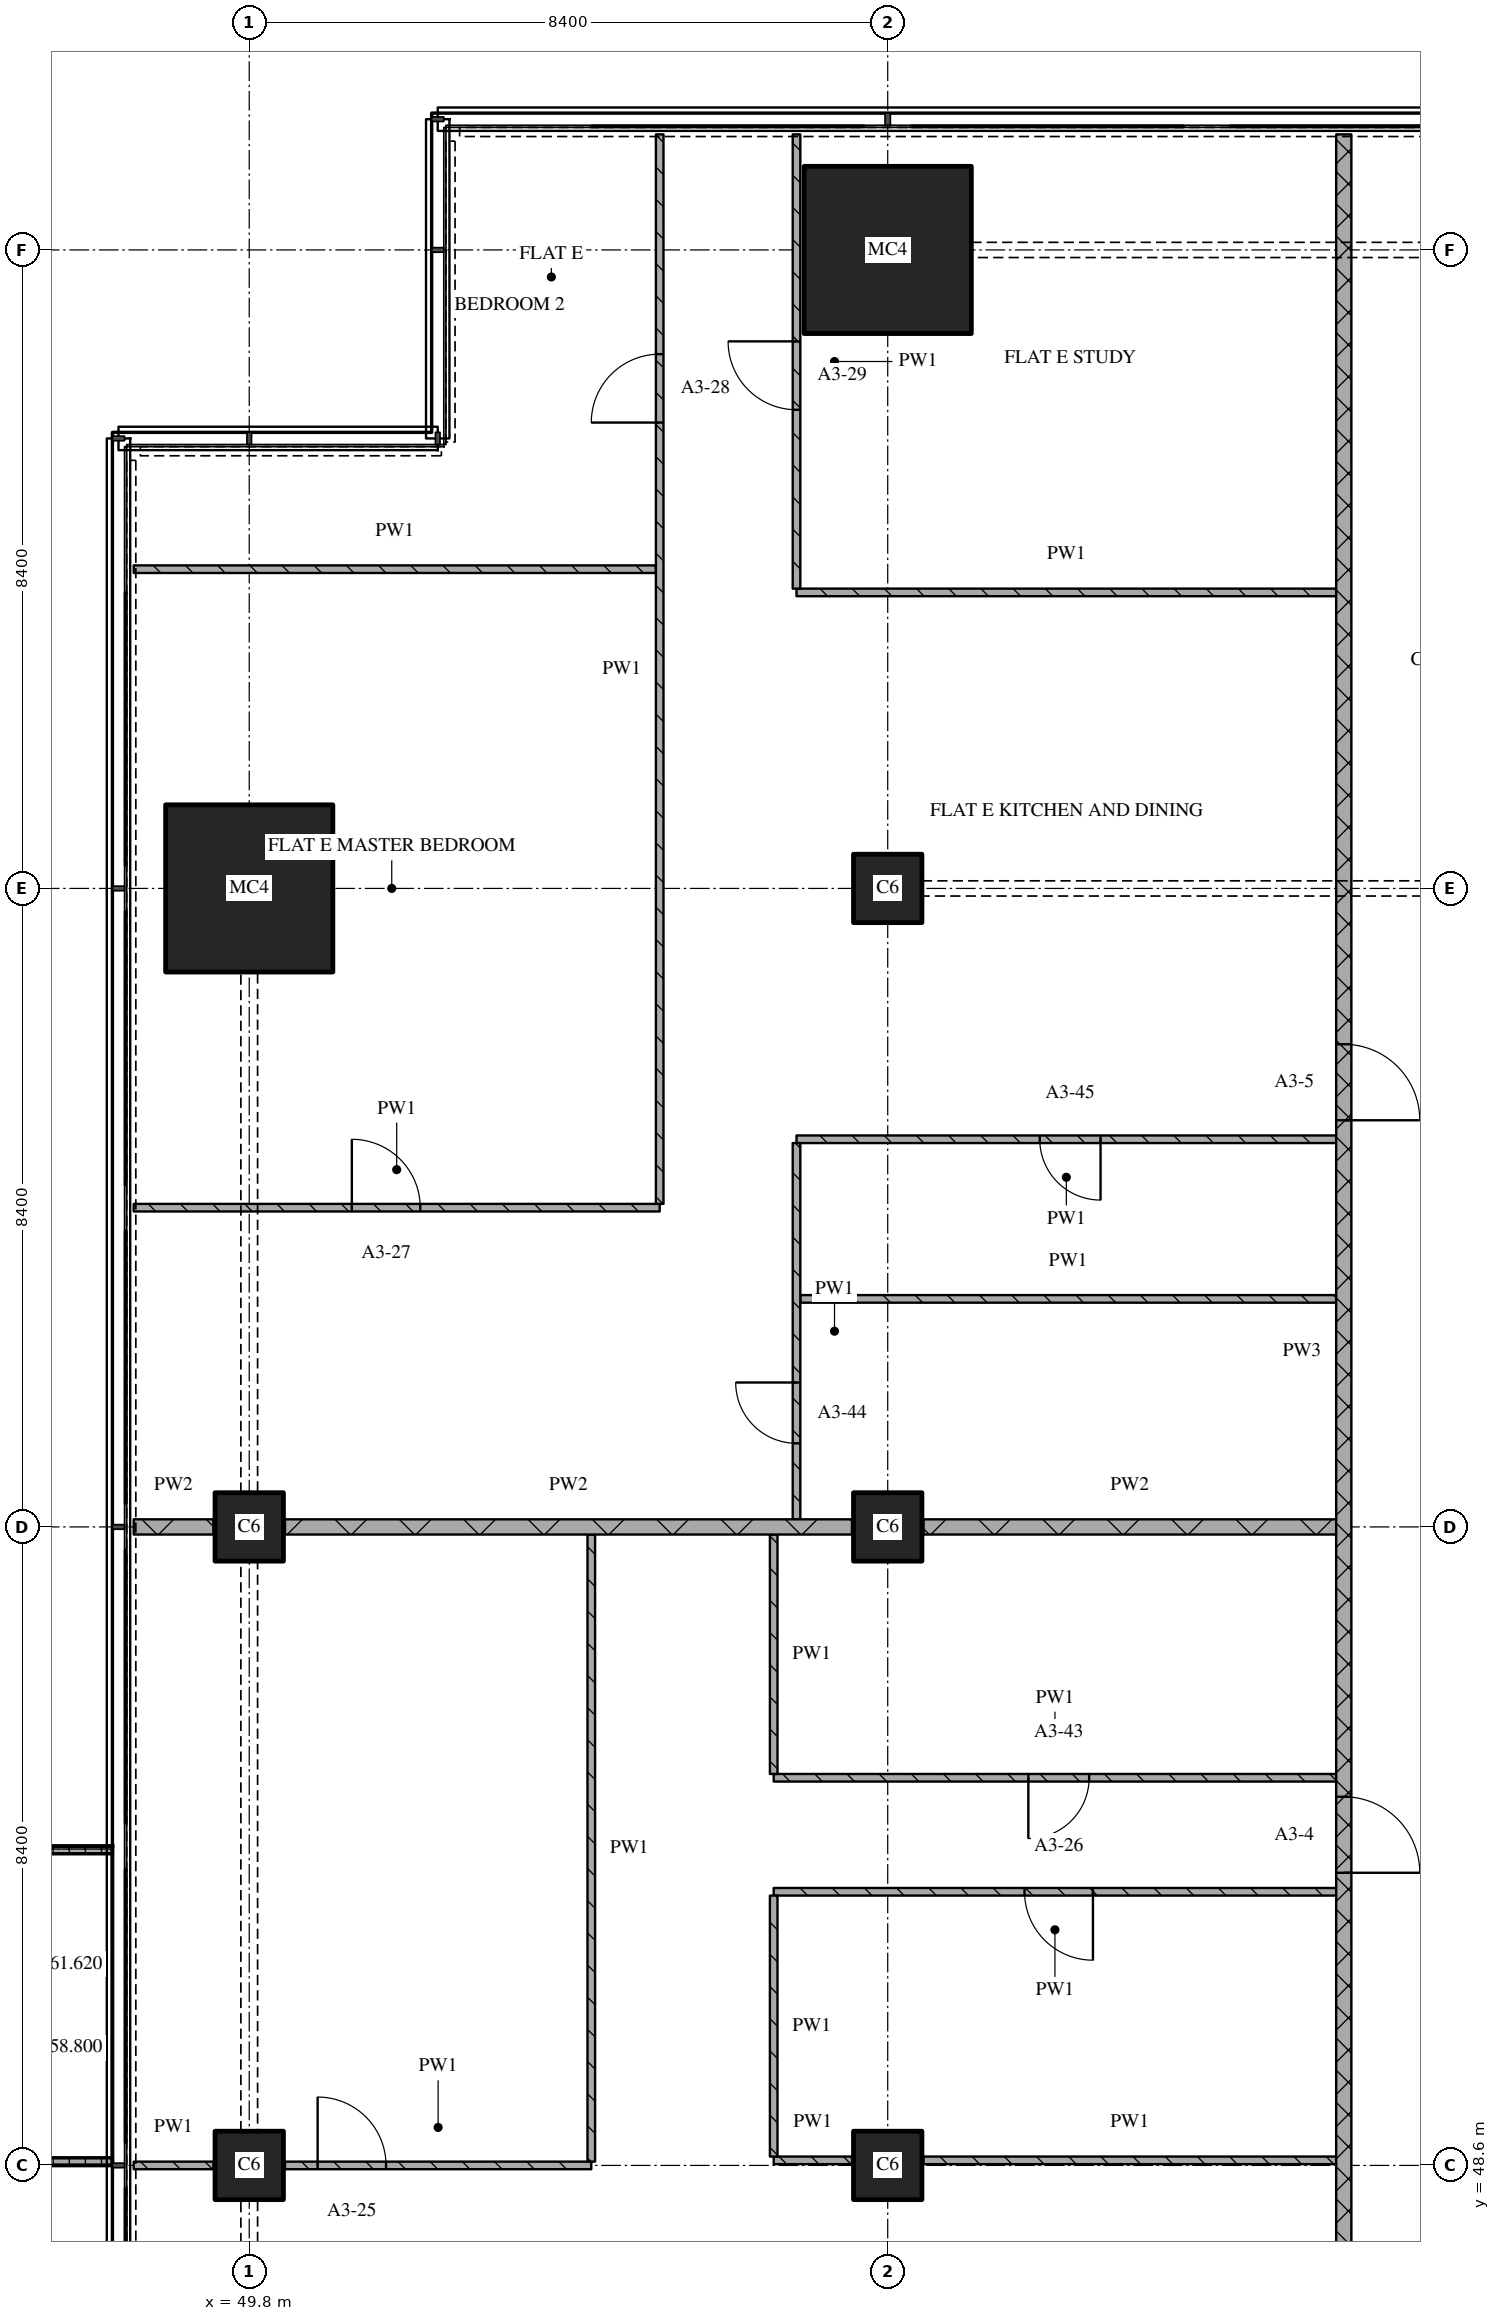
"""IFC4 building model, lengths in metres.
Left out: names, types, materials, properties, quantities, classifications, styles, units other than length and angle.
Written with IfcOpenShell. Run it as: python <this file> out.ifc"""

import sys

from ifc_helpers import new_model, si_unit, direction, frame, frame_2d, origin, origin_2d, place, context, subcontext, project, spatial, polyline, rectangle, outline, extrude, element, fill, save


model = new_model("IFC4")
c1 = context("Model", 3, precision=1e-05, world=origin(), true_north=direction((0.0, 1.0)))
c2 = subcontext(c1, "Body", "Model", "MODEL_VIEW")
j1 = project(units=[si_unit("LENGTHUNIT", "METRE"), si_unit("PLANEANGLEUNIT", "RADIAN")], contexts=[c1])
p1 = place(None, origin())
s1 = spatial("IfcSite", under=j1, at=p1, CompositionType="ELEMENT")
p2 = place(p1, origin())
s2 = spatial("IfcBuilding", under=s1, at=p2, CompositionType="ELEMENT")
p3 = place(p2, frame((0.0, 0.0, 58.8)))
s3 = spatial("IfcBuildingStorey", under=s2, at=p3, CompositionType="ELEMENT", Elevation=58.8)
for number, where, z_axis, x_axis in (
    (1, (49.8, 48.6, 0.0), (0.0, 0.0, 1.0), (1.0, 0.0, 0.0)),
    (2, (49.8, 57.0, 0.0), (0.0, 0.0, 1.0), (1.0, 0.0, 0.0)),
):
    element("IfcColumn", number, at=place(p3, frame(where, z_axis=z_axis, x_axis=x_axis)), inside=s3, PredefinedType="COLUMN", context=c2, shape_type="SweptSolid", body=[
        extrude(rectangle(XDim=0.9, YDim=0.9, at=origin_2d()), origin(), (0.0, 0.0, 1.0), 3.6),
    ])
p4 = place(p3, frame((49.8, 65.4, 0.0), z_axis=(0.0, 0.0, 1.0), x_axis=(1.0, 0.0, 0.0)))
e3 = element("IfcColumn", 3, at=p4, inside=s3, PredefinedType="COLUMN", context=c2, shape_type="SweptSolid", body=[
    extrude(rectangle(XDim=2.2, YDim=2.2, at=origin_2d()), origin(), (0.0, 0.0, 1.0), 3.6),
])
for number, where, z_axis, x_axis in (
    (4, (58.2, 48.6, 0.0), (0.0, 0.0, 1.0), (1.0, 0.0, 0.0)),
    (5, (58.2, 57.0, 0.0), (0.0, 0.0, 1.0), (1.0, 0.0, 0.0)),
    (6, (58.2, 65.4, 0.0), (0.0, 0.0, 1.0), (1.0, 0.0, 0.0)),
):
    element("IfcColumn", number, at=place(p3, frame(where, z_axis=z_axis, x_axis=x_axis)), inside=s3, PredefinedType="COLUMN", context=c2, shape_type="SweptSolid", body=[
        extrude(rectangle(XDim=0.9, YDim=0.9, at=origin_2d()), origin(), (0.0, 0.0, 1.0), 3.6),
    ])
p5 = place(p3, frame((58.2, 73.8, 0.0), z_axis=(0.0, 0.0, 1.0), x_axis=(1.0, 0.0, 0.0)))
e7 = element("IfcColumn", 7, at=p5, inside=s3, PredefinedType="COLUMN", context=c2, shape_type="SweptSolid", body=[
    extrude(rectangle(XDim=2.2, YDim=2.2, at=origin_2d()), origin(), (0.0, 0.0, 1.0), 3.6),
])
p6 = place(p3, origin())
e8 = element("IfcWall", 8, at=p6, inside=s3, PredefinedType="SOLIDWALL", context=c2, shape_type="SweptSolid", body=[
    extrude(outline(polyline([(48.0, 52.8), (48.0, 52.7), (46.367, 52.7), (46.367, 48.7), (48.0, 48.7), (48.0, 48.6), (46.267, 48.6), (46.267, 52.8), (48.0, 52.8)])), origin(), (0.0, 0.0, 1.0), 1.0),
])
p7 = place(p3, frame((48.28, 48.6, 0.0), z_axis=(0.0, 0.0, 1.0), x_axis=(1.0, 0.0, 0.0)))
e9 = element("IfcWall", 9, at=p7, inside=s3, PredefinedType="PARTITIONING", context=c2, shape_type="SweptSolid", body=[
    extrude(rectangle(XDim=1.05, YDim=0.1, at=frame_2d((0.525, 0.0))), origin(), (0.0, 0.0, 1.0), 3.32),
])
p8 = place(p3, frame((50.27, 48.6, 0.0), z_axis=(0.0, 0.0, 1.0), x_axis=(1.0, 0.0, 0.0)))
e10 = element("IfcWall", 10, at=p8, inside=s3, PredefinedType="PARTITIONING", context=c2, shape_type="SweptSolid", body=[
    extrude(rectangle(XDim=4.03, YDim=0.1, at=frame_2d((2.015, 0.0))), origin(), (0.0, 0.0, 1.0), 3.32),
])
p9 = place(p8, frame((0.43, 0.0, 0.0)))
e11 = element("IfcOpeningElement", 11, at=p9, cuts=e10, PredefinedType="OPENING", context=c2, shape_type="SweptSolid", body=[
    extrude(rectangle(XDim=0.9, YDim=2.1, at=frame_2d((0.45, 1.05))), frame((0.0, 0.06, 0.0), z_axis=(0.0, -1.0, 0.0), x_axis=(1.0, 0.0, 0.0)), (0.0, 0.0, 1.0), 0.12),
])
p10 = place(p3, frame((56.7, 48.667, 0.0), z_axis=(0.0, 0.0, 1.0), x_axis=(1.0, 0.0, 0.0)))
e12 = element("IfcWall", 12, at=p10, inside=s3, PredefinedType="PARTITIONING", context=c2, shape_type="SweptSolid", body=[
    extrude(rectangle(XDim=1.03, YDim=0.1, at=frame_2d((0.515, 0.0))), origin(), (0.0, 0.0, 1.0), 3.32),
])
p11 = place(p3, frame((58.67, 48.667, 0.0), z_axis=(0.0, 0.0, 1.0), x_axis=(1.0, 0.0, 0.0)))
e13 = element("IfcWall", 13, at=p11, inside=s3, PredefinedType="PARTITIONING", context=c2, shape_type="SweptSolid", body=[
    extrude(rectangle(XDim=5.43, YDim=0.1, at=frame_2d((2.715, 0.0))), origin(), (0.0, 0.0, 1.0), 3.32),
])
p12 = place(p3, frame((64.1, 52.2, 0.0), z_axis=(0.0, 0.0, 1.0), x_axis=(-1.0, 0.0, 0.0)))
e14 = element("IfcWall", 14, at=p12, inside=s3, PredefinedType="PARTITIONING", context=c2, shape_type="SweptSolid", body=[
    extrude(rectangle(XDim=7.4, YDim=0.1, at=frame_2d((3.7, 0.0))), origin(), (0.0, 0.0, 1.0), 3.32),
])
p13 = place(p12, frame((3.2, 0.0, 0.0)))
e15 = element("IfcOpeningElement", 15, at=p13, cuts=e14, PredefinedType="OPENING", context=c2, shape_type="SweptSolid", body=[
    extrude(rectangle(XDim=0.9, YDim=2.1, at=frame_2d((0.45, 1.05))), frame((0.0, 0.06, 0.0), z_axis=(0.0, -1.0, 0.0), x_axis=(1.0, 0.0, 0.0)), (0.0, 0.0, 1.0), 0.12),
])
p14 = place(p3, frame((56.7, 53.7, 0.0), z_axis=(0.0, 0.0, 1.0), x_axis=(1.0, 0.0, 0.0)))
e16 = element("IfcWall", 16, at=p14, inside=s3, PredefinedType="PARTITIONING", context=c2, shape_type="SweptSolid", body=[
    extrude(rectangle(XDim=7.4, YDim=0.1, at=frame_2d((3.7, 0.0))), origin(), (0.0, 0.0, 1.0), 3.32),
])
p15 = place(p14, frame((3.35, 0.0, 0.0)))
e17 = element("IfcOpeningElement", 17, at=p15, cuts=e16, PredefinedType="OPENING", context=c2, shape_type="SweptSolid", body=[
    extrude(rectangle(XDim=0.8, YDim=2.1, at=frame_2d((0.4, 1.05))), frame((0.0, 0.06, 0.0), z_axis=(0.0, -1.0, 0.0), x_axis=(1.0, 0.0, 0.0)), (0.0, 0.0, 1.0), 0.12),
])
p16 = place(p3, frame((48.28, 57.0, 0.0), z_axis=(0.0, 0.0, 1.0), x_axis=(1.0, 0.0, 0.0)))
e18 = element("IfcWall", 18, at=p16, inside=s3, PredefinedType="PARTITIONING", context=c2, shape_type="SweptSolid", body=[
    extrude(rectangle(XDim=1.05, YDim=0.2, at=frame_2d((0.525, 0.0))), origin(), (0.0, 0.0, 1.0), 3.32),
])
p17 = place(p3, frame((50.27, 57.0, 0.0), z_axis=(0.0, 0.0, 1.0), x_axis=(1.0, 0.0, 0.0)))
e19 = element("IfcWall", 19, at=p17, inside=s3, PredefinedType="PARTITIONING", context=c2, shape_type="SweptSolid", body=[
    extrude(rectangle(XDim=7.46, YDim=0.2, at=frame_2d((3.73, 0.0))), origin(), (0.0, 0.0, 1.0), 3.32),
])
p18 = place(p3, frame((58.67, 57.0, 0.0), z_axis=(0.0, 0.0, 1.0), x_axis=(1.0, 0.0, 0.0)))
e20 = element("IfcWall", 20, at=p18, inside=s3, PredefinedType="PARTITIONING", context=c2, shape_type="SweptSolid", body=[
    extrude(rectangle(XDim=5.43, YDim=0.2, at=frame_2d((2.715, 0.0))), origin(), (0.0, 0.0, 1.0), 3.32),
])
p19 = place(p3, frame((57.05, 60.0, 0.0), z_axis=(0.0, 0.0, 1.0), x_axis=(1.0, 0.0, 0.0)))
e21 = element("IfcWall", 21, at=p19, inside=s3, PredefinedType="PARTITIONING", context=c2, shape_type="SweptSolid", body=[
    extrude(rectangle(XDim=7.05, YDim=0.1, at=frame_2d((3.525, 0.0))), origin(), (0.0, 0.0, 1.0), 3.32),
])
p20 = place(p3, frame((48.28, 61.2, 0.0), z_axis=(0.0, 0.0, 1.0), x_axis=(1.0, 0.0, 0.0)))
e22 = element("IfcWall", 22, at=p20, inside=s3, PredefinedType="PARTITIONING", context=c2, shape_type="SweptSolid", body=[
    extrude(rectangle(XDim=6.92, YDim=0.1, at=frame_2d((3.46, 0.0))), origin(), (0.0, 0.0, 1.0), 3.32),
])
p21 = place(p20, frame((2.87, 0.0, 0.0)))
e23 = element("IfcOpeningElement", 23, at=p21, cuts=e22, PredefinedType="OPENING", context=c2, shape_type="SweptSolid", body=[
    extrude(rectangle(XDim=0.9, YDim=2.1, at=frame_2d((0.45, 1.05))), frame((0.0, 0.06, 0.0), z_axis=(0.0, -1.0, 0.0), x_axis=(1.0, 0.0, 0.0)), (0.0, 0.0, 1.0), 0.12),
])
p22 = place(p3, frame((64.1, 62.1, 0.0), z_axis=(0.0, 0.0, 1.0), x_axis=(-1.0, 0.0, 0.0)))
e24 = element("IfcWall", 24, at=p22, inside=s3, PredefinedType="PARTITIONING", context=c2, shape_type="SweptSolid", body=[
    extrude(rectangle(XDim=7.1, YDim=0.1, at=frame_2d((3.55, 0.0))), origin(), (0.0, 0.0, 1.0), 3.32),
])
p23 = place(p22, frame((3.1, 0.0, 0.0)))
e25 = element("IfcOpeningElement", 25, at=p23, cuts=e24, PredefinedType="OPENING", context=c2, shape_type="SweptSolid", body=[
    extrude(rectangle(XDim=0.8, YDim=2.1, at=frame_2d((0.4, 1.05))), frame((0.0, 0.06, 0.0), z_axis=(0.0, -1.0, 0.0), x_axis=(1.0, 0.0, 0.0)), (0.0, 0.0, 1.0), 0.12),
])
p24 = place(p3, frame((57.0, 69.294, 0.0), z_axis=(0.0, 0.0, 1.0), x_axis=(1.0, 0.0, 0.0)))
e26 = element("IfcWall", 26, at=p24, inside=s3, PredefinedType="PARTITIONING", context=c2, shape_type="SweptSolid", body=[
    extrude(rectangle(XDim=7.1, YDim=0.1, at=frame_2d((3.55, 0.0))), origin(), (0.0, 0.0, 1.0), 3.32),
])
p25 = place(p3, frame((48.28, 69.6, 0.0), z_axis=(0.0, 0.0, 1.0), x_axis=(1.0, 0.0, 0.0)))
e27 = element("IfcWall", 27, at=p25, inside=s3, PredefinedType="PARTITIONING", context=c2, shape_type="SweptSolid", body=[
    extrude(rectangle(XDim=6.87, YDim=0.1, at=frame_2d((3.435, 0.0))), origin(), (0.0, 0.0, 1.0), 3.32),
])
p26 = place(p3, frame((54.3, 56.9, 0.0), z_axis=(0.0, 0.0, 1.0), x_axis=(0.0, -1.0, 0.0)))
e28 = element("IfcWall", 28, at=p26, inside=s3, PredefinedType="PARTITIONING", context=c2, shape_type="SweptSolid", body=[
    extrude(rectangle(XDim=8.25, YDim=0.1, at=frame_2d((4.125, 0.0))), origin(), (0.0, 0.0, 1.0), 3.32),
])
p27 = place(p3, frame((55.2, 61.25, 0.0), z_axis=(0.0, 0.0, 1.0), x_axis=(0.0, 1.0, 0.0)))
e29 = element("IfcWall", 29, at=p27, inside=s3, PredefinedType="PARTITIONING", context=c2, shape_type="SweptSolid", body=[
    extrude(rectangle(XDim=14.07, YDim=0.1, at=frame_2d((7.035, 0.0))), origin(), (0.0, 0.0, 1.0), 3.32),
])
p28 = place(p27, frame((10.279, 0.0, 0.0)))
e30 = element("IfcOpeningElement", 30, at=p28, cuts=e29, PredefinedType="OPENING", context=c2, shape_type="SweptSolid", body=[
    extrude(rectangle(XDim=0.9, YDim=2.1, at=frame_2d((0.45, 1.05))), frame((0.0, 0.06, 0.0), z_axis=(0.0, -1.0, 0.0), x_axis=(1.0, 0.0, 0.0)), (0.0, 0.0, 1.0), 0.12),
])
p29 = place(p3, frame((56.7, 52.15, 0.0), z_axis=(0.0, 0.0, 1.0), x_axis=(0.0, -1.0, 0.0)))
e31 = element("IfcWall", 31, at=p29, inside=s3, PredefinedType="PARTITIONING", context=c2, shape_type="SweptSolid", body=[
    extrude(rectangle(XDim=3.433, YDim=0.1, at=frame_2d((1.717, 0.0))), origin(), (0.0, 0.0, 1.0), 3.32),
])
p30 = place(p3, frame((56.7, 56.9, 0.0), z_axis=(0.0, 0.0, 1.0), x_axis=(0.0, -1.0, 0.0)))
e32 = element("IfcWall", 32, at=p30, inside=s3, PredefinedType="PARTITIONING", context=c2, shape_type="SweptSolid", body=[
    extrude(rectangle(XDim=3.15, YDim=0.1, at=frame_2d((1.575, 0.0))), origin(), (0.0, 0.0, 1.0), 3.32),
])
p31 = place(p3, frame((57.0, 62.05, 0.0), z_axis=(0.0, 0.0, 1.0), x_axis=(0.0, -1.0, 0.0)))
e33 = element("IfcWall", 33, at=p31, inside=s3, PredefinedType="PARTITIONING", context=c2, shape_type="SweptSolid", body=[
    extrude(rectangle(XDim=4.95, YDim=0.1, at=frame_2d((2.475, 0.0))), origin(), (0.0, 0.0, 1.0), 3.32),
])
p32 = place(p31, frame((3.15, 0.0, 0.0)))
e34 = element("IfcOpeningElement", 34, at=p32, cuts=e33, PredefinedType="OPENING", context=c2, shape_type="SweptSolid", body=[
    extrude(rectangle(XDim=0.8, YDim=2.1, at=frame_2d((0.4, 1.05))), frame((0.0, 0.06, 0.0), z_axis=(0.0, -1.0, 0.0), x_axis=(1.0, 0.0, 0.0)), (0.0, 0.0, 1.0), 0.12),
])
p33 = place(p3, frame((57.0, 75.32, 0.0), z_axis=(0.0, 0.0, 1.0), x_axis=(0.0, -1.0, 0.0)))
e35 = element("IfcWall", 35, at=p33, inside=s3, PredefinedType="PARTITIONING", context=c2, shape_type="SweptSolid", body=[
    extrude(rectangle(XDim=5.976, YDim=0.1, at=frame_2d((2.988, 0.0))), origin(), (0.0, 0.0, 1.0), 3.32),
])
p34 = place(p33, frame((2.723, 0.0, 0.0)))
e36 = element("IfcOpeningElement", 36, at=p34, cuts=e35, PredefinedType="OPENING", context=c2, shape_type="SweptSolid", body=[
    extrude(rectangle(XDim=0.9, YDim=2.1, at=frame_2d((0.45, 1.05))), frame((0.0, 0.06, 0.0), z_axis=(0.0, -1.0, 0.0), x_axis=(1.0, 0.0, 0.0)), (0.0, 0.0, 1.0), 0.12),
])
p35 = place(p3, frame((64.2, 43.3, 0.0), z_axis=(0.0, 0.0, 1.0), x_axis=(0.0, 1.0, 0.0)))
e37 = element("IfcWall", 37, at=p35, inside=s3, PredefinedType="PARTITIONING", context=c2, shape_type="SweptSolid", body=[
    extrude(rectangle(XDim=32.02, YDim=0.2, at=frame_2d((16.01, 0.0))), origin(), (0.0, 0.0, 1.0), 3.32),
])
p36 = place(p35, frame((9.15, 0.0, 0.0)))
e38 = element("IfcOpeningElement", 38, at=p36, cuts=e37, PredefinedType="OPENING", context=c2, shape_type="SweptSolid", body=[
    extrude(rectangle(XDim=1.0, YDim=2.1, at=frame_2d((0.5, 1.05))), frame((0.0, 0.11, 0.0), z_axis=(0.0, -1.0, 0.0), x_axis=(1.0, 0.0, 0.0)), (0.0, 0.0, 1.0), 0.22),
])
p37 = place(p35, frame((19.05, 0.0, 0.0)))
e39 = element("IfcOpeningElement", 39, at=p37, cuts=e37, PredefinedType="OPENING", context=c2, shape_type="SweptSolid", body=[
    extrude(rectangle(XDim=1.0, YDim=2.1, at=frame_2d((0.5, 1.05))), frame((0.0, 0.11, 0.0), z_axis=(0.0, -1.0, 0.0), x_axis=(1.0, 0.0, 0.0)), (0.0, 0.0, 1.0), 0.22),
])
p38 = place(p9, origin())
e40 = element("IfcDoor", 40, at=p38, inside=s3, OperationType="SINGLE_SWING_LEFT", PredefinedType="DOOR", context=c2, shape_type="SweptSolid", body=[
    extrude(rectangle(XDim=0.9, YDim=2.1, at=frame_2d((0.45, 1.05))), frame((0.0, 0.025, 0.0), z_axis=(0.0, -1.0, 0.0), x_axis=(1.0, 0.0, 0.0)), (0.0, 0.0, 1.0), 0.05),
])
fill(e11, e40)
p39 = place(p13, origin())
e41 = element("IfcDoor", 41, at=p39, inside=s3, OperationType="SINGLE_SWING_LEFT", PredefinedType="DOOR", context=c2, shape_type="SweptSolid", body=[
    extrude(rectangle(XDim=0.9, YDim=2.1, at=frame_2d((0.45, 1.05))), frame((0.0, 0.025, 0.0), z_axis=(0.0, -1.0, 0.0), x_axis=(1.0, 0.0, 0.0)), (0.0, 0.0, 1.0), 0.05),
])
fill(e15, e41)
p40 = place(p15, origin())
e42 = element("IfcDoor", 42, at=p40, inside=s3, OperationType="SINGLE_SWING_RIGHT", PredefinedType="DOOR", context=c2, shape_type="SweptSolid", body=[
    extrude(rectangle(XDim=0.8, YDim=2.1, at=frame_2d((0.4, 1.05))), frame((0.0, 0.025, 0.0), z_axis=(0.0, -1.0, 0.0), x_axis=(1.0, 0.0, 0.0)), (0.0, 0.0, 1.0), 0.05),
])
fill(e17, e42)
p41 = place(p21, origin())
e43 = element("IfcDoor", 43, at=p41, inside=s3, OperationType="SINGLE_SWING_LEFT", PredefinedType="DOOR", context=c2, shape_type="SweptSolid", body=[
    extrude(rectangle(XDim=0.9, YDim=2.1, at=frame_2d((0.45, 1.05))), frame((0.0, 0.025, 0.0), z_axis=(0.0, -1.0, 0.0), x_axis=(1.0, 0.0, 0.0)), (0.0, 0.0, 1.0), 0.05),
])
fill(e23, e43)
p42 = place(p23, origin())
e44 = element("IfcDoor", 44, at=p42, inside=s3, OperationType="SINGLE_SWING_LEFT", PredefinedType="DOOR", context=c2, shape_type="SweptSolid", body=[
    extrude(rectangle(XDim=0.8, YDim=2.1, at=frame_2d((0.4, 1.05))), frame((0.0, 0.025, 0.0), z_axis=(0.0, -1.0, 0.0), x_axis=(1.0, 0.0, 0.0)), (0.0, 0.0, 1.0), 0.05),
])
fill(e25, e44)
p43 = place(p28, origin())
e45 = element("IfcDoor", 45, at=p43, inside=s3, OperationType="SINGLE_SWING_LEFT", PredefinedType="DOOR", context=c2, shape_type="SweptSolid", body=[
    extrude(rectangle(XDim=0.9, YDim=2.1, at=frame_2d((0.45, 1.05))), frame((0.0, 0.025, 0.0), z_axis=(0.0, -1.0, 0.0), x_axis=(1.0, 0.0, 0.0)), (0.0, 0.0, 1.0), 0.05),
])
fill(e30, e45)
p44 = place(p32, origin())
e46 = element("IfcDoor", 46, at=p44, inside=s3, OperationType="SINGLE_SWING_RIGHT", PredefinedType="DOOR", context=c2, shape_type="SweptSolid", body=[
    extrude(rectangle(XDim=0.8, YDim=2.1, at=frame_2d((0.4, 1.05))), frame((0.0, 0.025, 0.0), z_axis=(0.0, -1.0, 0.0), x_axis=(1.0, 0.0, 0.0)), (0.0, 0.0, 1.0), 0.05),
])
fill(e34, e46)
p45 = place(p34, origin())
e47 = element("IfcDoor", 47, at=p45, inside=s3, OperationType="SINGLE_SWING_RIGHT", PredefinedType="DOOR", context=c2, shape_type="SweptSolid", body=[
    extrude(rectangle(XDim=0.9, YDim=2.1, at=frame_2d((0.45, 1.05))), frame((0.0, 0.025, 0.0), z_axis=(0.0, -1.0, 0.0), x_axis=(1.0, 0.0, 0.0)), (0.0, 0.0, 1.0), 0.05),
])
fill(e36, e47)
p46 = place(p36, origin())
e48 = element("IfcDoor", 48, at=p46, inside=s3, OperationType="SINGLE_SWING_RIGHT", PredefinedType="DOOR", context=c2, shape_type="SweptSolid", body=[
    extrude(rectangle(XDim=1.0, YDim=2.1, at=frame_2d((0.5, 1.05))), frame((0.0, 0.025, 0.0), z_axis=(0.0, -1.0, 0.0), x_axis=(1.0, 0.0, 0.0)), (0.0, 0.0, 1.0), 0.05),
])
fill(e38, e48)
p47 = place(p37, origin())
e49 = element("IfcDoor", 49, at=p47, inside=s3, OperationType="SINGLE_SWING_RIGHT", PredefinedType="DOOR", context=c2, shape_type="SweptSolid", body=[
    extrude(rectangle(XDim=1.0, YDim=2.1, at=frame_2d((0.5, 1.05))), frame((0.0, 0.025, 0.0), z_axis=(0.0, -1.0, 0.0), x_axis=(1.0, 0.0, 0.0)), (0.0, 0.0, 1.0), 0.05),
])
fill(e39, e49)
save(model, sys.argv[1])
